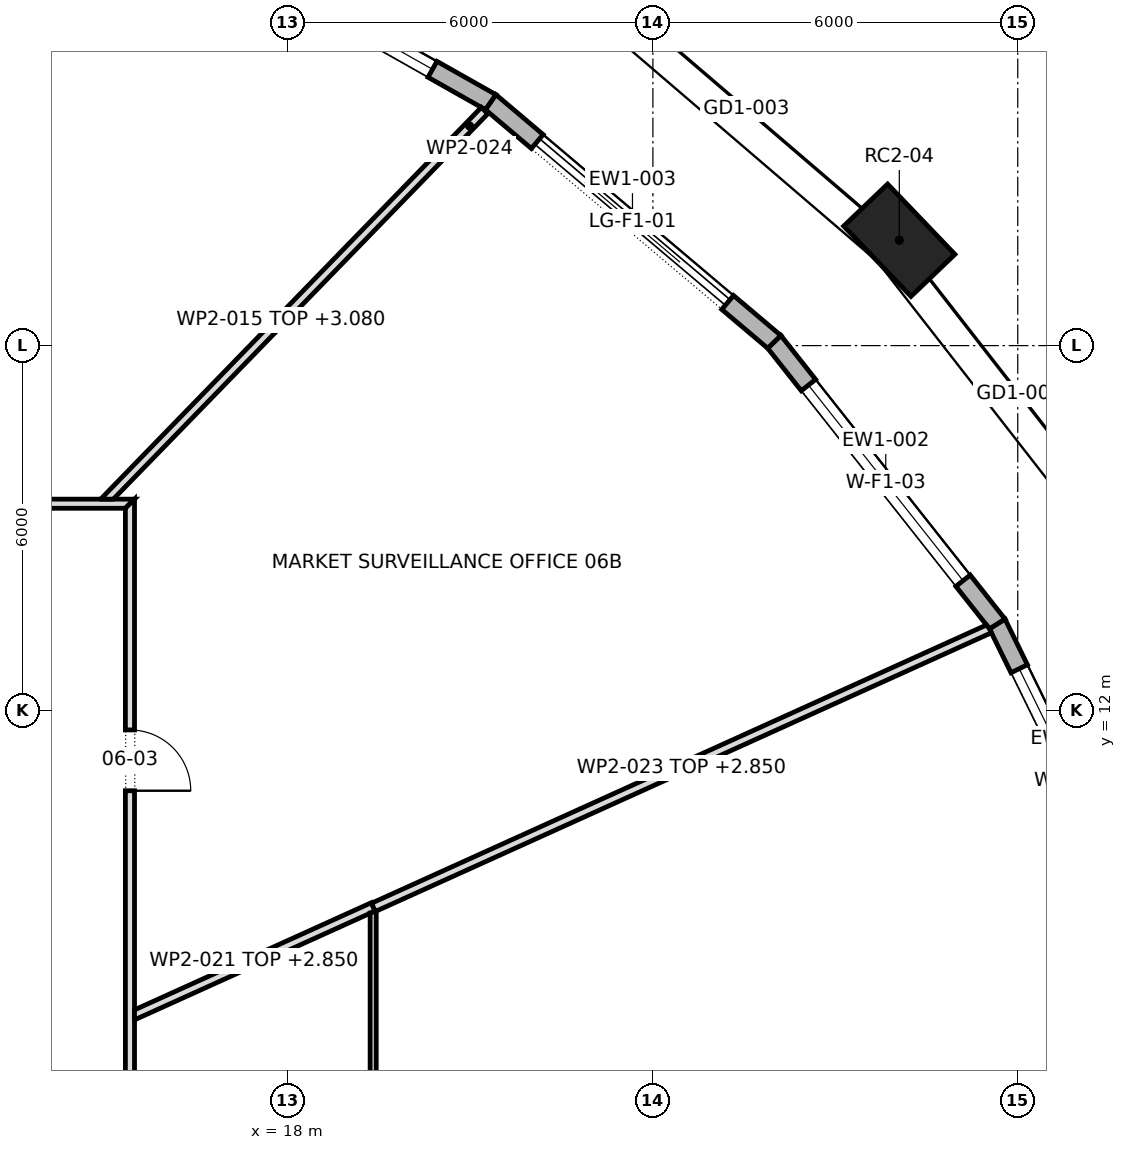
"""IFC4 building model, lengths in metres.
Left out: names, types, materials, properties, quantities, classifications, styles, units other than length and angle.
Written with IfcOpenShell. Run it as: python <this file> out.ifc"""

import sys

from ifc_helpers import new_model, si_unit, direction, frame, frame_2d, origin, origin_2d, place, context, subcontext, project, spatial, polyline, rectangle, outline, extrude, element, fill, save


model = new_model("IFC4")
c1 = context("Model", 3, precision=1e-05, world=origin(), true_north=direction((0.0, 1.0)))
c2 = subcontext(c1, "Body", "Model", "MODEL_VIEW")
j1 = project(units=[si_unit("LENGTHUNIT", "METRE"), si_unit("PLANEANGLEUNIT", "RADIAN")], contexts=[c1])
p1 = place(None, origin())
s1 = spatial("IfcSite", under=j1, at=p1, CompositionType="ELEMENT")
p2 = place(p1, origin())
s2 = spatial("IfcBuilding", under=s1, at=p2, CompositionType="ELEMENT")
p3 = place(p2, frame((0.0, 0.0, 86.5)))
s3 = spatial("IfcBuildingStorey", under=s2, at=p3, CompositionType="ELEMENT", Elevation=86.5)
p4 = place(p3, frame((28.052, 19.733, 0.0), z_axis=(0.0, 0.0, 1.0), x_axis=(-0.691576091297, 0.722303613411, 0.0)))
e1 = element("IfcColumn", 1, at=p4, inside=s3, PredefinedType="COLUMN", context=c2, shape_type="SweptSolid", body=[
    extrude(rectangle(XDim=1.6, YDim=1.0, at=origin_2d()), origin(), (0.0, 0.0, 1.0), 4.2),
])
p5 = place(p3, frame((32.19, 8.267, 0.0), z_axis=(0.0, 0.0, 1.0), x_axis=(-0.44010747541, 0.897945104162, 0.0)))
e2 = element("IfcWall", 2, at=p5, inside=s3, PredefinedType="STANDARD", context=c2, shape_type="SweptSolid", body=[
    extrude(outline(polyline([(-0.017, -0.15), (5.758, -0.15), (5.726, 0.15), (0.017, 0.15), (-0.017, -0.15)])), origin(), (0.0, 0.0, 1.0), 3.9),
])
p6 = place(p5, frame((0.821, 0.0, 0.6)))
e3 = element("IfcOpeningElement", 3, at=p6, cuts=e2, PredefinedType="OPENING", context=c2, shape_type="SweptSolid", body=[
    extrude(rectangle(XDim=4.1, YDim=2.85, at=frame_2d((2.05, 1.425))), frame((0.0, 0.162, 0.0), z_axis=(0.0, -1.0, 0.0), x_axis=(1.0, 0.0, 0.0)), (0.0, 0.0, 1.0), 0.324),
])
p7 = place(p3, frame((29.663, 13.423, 0.0), z_axis=(0.0, 0.0, 1.0), x_axis=(-0.620142219764, 0.784489405452, 0.0)))
e4 = element("IfcWall", 4, at=p7, inside=s3, PredefinedType="STANDARD", context=c2, shape_type="SweptSolid", body=[
    extrude(outline(polyline([(-0.016, -0.15), (5.927, -0.15), (5.897, 0.15), (0.016, 0.15), (-0.016, -0.15)])), origin(), (0.0, 0.0, 1.0), 3.9),
])
p8 = place(p7, frame((0.906, 0.0, 0.6)))
e5 = element("IfcOpeningElement", 5, at=p8, cuts=e4, PredefinedType="OPENING", context=c2, shape_type="SweptSolid", body=[
    extrude(rectangle(XDim=4.1, YDim=2.85, at=frame_2d((2.05, 1.425))), frame((0.0, 0.162, 0.0), z_axis=(0.0, -1.0, 0.0), x_axis=(1.0, 0.0, 0.0)), (0.0, 0.0, 1.0), 0.324),
])
p9 = place(p3, frame((25.996, 18.062, 0.0), z_axis=(0.0, 0.0, 1.0), x_axis=(-0.763753100684, 0.645508482667, 0.0)))
e6 = element("IfcWall", 6, at=p9, inside=s3, PredefinedType="STANDARD", context=c2, shape_type="SweptSolid", body=[
    extrude(outline(polyline([(-0.015, -0.15), (6.122, -0.15), (6.093, 0.15), (0.015, 0.15), (-0.015, -0.15)])), origin(), (0.0, 0.0, 1.0), 3.9),
])
p10 = place(p9, frame((1.004, 0.0, 0.0)))
e7 = element("IfcOpeningElement", 7, at=p10, cuts=e6, PredefinedType="OPENING", context=c2, shape_type="SweptSolid", body=[
    extrude(rectangle(XDim=4.1, YDim=3.45, at=frame_2d((2.05, 1.725))), frame((0.0, 0.162, 0.0), z_axis=(0.0, -1.0, 0.0), x_axis=(1.0, 0.0, 0.0)), (0.0, 0.0, 1.0), 0.324),
])
p11 = place(p3, frame((21.332, 22.004, 0.0), z_axis=(0.0, 0.0, 1.0), x_axis=(-0.870737550302, 0.491748023376, 0.0)))
e8 = element("IfcWall", 8, at=p11, inside=s3, PredefinedType="STANDARD", context=c2, shape_type="SweptSolid", body=[
    extrude(outline(polyline([(-0.014, -0.15), (6.31, -0.15), (6.283, 0.15), (0.014, 0.15), (-0.014, -0.15)])), origin(), (0.0, 0.0, 1.0), 3.9),
])
p12 = place(p11, frame((1.098, 0.0, 0.6)))
e9 = element("IfcOpeningElement", 9, at=p12, cuts=e8, PredefinedType="OPENING", context=c2, shape_type="SweptSolid", body=[
    extrude(rectangle(XDim=4.1, YDim=2.85, at=frame_2d((2.05, 1.425))), frame((0.0, 0.162, 0.0), z_axis=(0.0, -1.0, 0.0), x_axis=(1.0, 0.0, 0.0)), (0.0, 0.0, 1.0), 0.324),
])
p13 = place(p3, frame((-15.475, 15.4, 0.0), z_axis=(0.0, 0.0, 1.0), x_axis=(1.0, 0.0, 0.0)))
e10 = element("IfcWall", 10, at=p13, inside=s3, PredefinedType="PARTITIONING", context=c2, shape_type="SweptSolid", body=[
    extrude(outline(polyline([(0.15, -0.075), (2.066, -0.075), (3.981, -0.075), (5.897, -0.075), (7.812, -0.075), (9.728, -0.075), (11.644, -0.075), (13.56, -0.075), (15.475, -0.075), (17.391, -0.075), (19.306, -0.075), (21.222, -0.075), (23.138, -0.075), (25.053, -0.075), (26.969, -0.075), (28.885, -0.075), (30.8, -0.075), (30.95, 0.075), (29.016, 0.075), (27.081, 0.075), (25.147, 0.075), (23.212, 0.075), (21.278, 0.075), (19.344, 0.075), (17.409, 0.075), (15.475, 0.075), (13.541, 0.075), (11.606, 0.075), (9.672, 0.075), (7.738, 0.075), (5.803, 0.075), (3.869, 0.075), (1.935, 0.075), (0.0, 0.075), (0.15, -0.075)])), origin(), (0.0, 0.0, 1.0), 3.9),
])
p14 = place(p13, frame((21.155, 0.0, 0.0)))
e11 = element("IfcOpeningElement", 11, at=p14, cuts=e10, PredefinedType="OPENING", context=c2, shape_type="SweptSolid", body=[
    extrude(rectangle(XDim=1.8, YDim=2.1, at=frame_2d((0.9, 1.05))), frame((0.0, 0.087, 0.0), z_axis=(0.0, -1.0, 0.0), x_axis=(1.0, 0.0, 0.0)), (0.0, 0.0, 1.0), 0.174),
])
p15 = place(p13, frame((9.21, 0.0, 0.0)))
e12 = element("IfcOpeningElement", 12, at=p15, cuts=e10, PredefinedType="OPENING", context=c2, shape_type="SweptSolid", body=[
    extrude(rectangle(XDim=1.0, YDim=2.1, at=frame_2d((0.5, 1.05))), frame((0.0, 0.087, 0.0), z_axis=(0.0, -1.0, 0.0), x_axis=(1.0, 0.0, 0.0)), (0.0, 0.0, 1.0), 0.174),
])
p16 = place(p13, frame((2.405, 0.0, 0.0)))
e13 = element("IfcOpeningElement", 13, at=p16, cuts=e10, PredefinedType="OPENING", context=c2, shape_type="SweptSolid", body=[
    extrude(rectangle(XDim=1.0, YDim=2.1, at=frame_2d((0.5, 1.05))), frame((0.0, 0.087, 0.0), z_axis=(0.0, -1.0, 0.0), x_axis=(1.0, 0.0, 0.0)), (0.0, 0.0, 1.0), 0.174),
])
p17 = place(p3, frame((14.972, 15.423, 0.0), z_axis=(0.0, 0.0, 1.0), x_axis=(0.696854208529, 0.717212808067, 0.0)))
e14 = element("IfcWall", 14, at=p17, inside=s3, PredefinedType="PARTITIONING", context=c2, shape_type="SweptSolid", body=[
    extrude(outline(polyline([(0.0, 0.075), (0.0, 0.074), (0.145, -0.075), (1.771, -0.075), (3.397, -0.075), (5.023, -0.075), (6.649, -0.075), (8.274, -0.075), (8.274, 0.075), (6.62, 0.075), (4.965, 0.075), (3.31, 0.075), (1.655, 0.075), (0.0, 0.075)])), origin(), (0.0, 0.0, 1.0), 3.08),
])
p18 = place(p3, frame((15.4, -4.54, 0.0), z_axis=(0.0, 0.0, 1.0), x_axis=(0.0, 1.0, 0.0)))
e15 = element("IfcWall", 15, at=p18, inside=s3, PredefinedType="PARTITIONING", context=c2, shape_type="SweptSolid", body=[
    extrude(outline(polyline([(0.0, -0.075), (1.82, -0.075), (3.639, -0.075), (5.458, -0.075), (7.278, -0.075), (9.098, -0.075), (10.917, -0.075), (12.737, -0.075), (14.556, -0.075), (16.376, -0.075), (18.195, -0.075), (20.015, -0.075), (19.865, 0.075), (17.878, 0.075), (15.892, 0.075), (13.906, 0.075), (11.919, 0.075), (9.933, 0.075), (7.946, 0.075), (5.959, 0.075), (3.973, 0.075), (1.987, 0.075), (0.0, 0.075), (0.0, -0.075)])), origin(), (0.0, 0.0, 1.0), 3.9),
])
p19 = place(p18, frame((5.25, 0.0, 0.0)))
e16 = element("IfcOpeningElement", 16, at=p19, cuts=e15, PredefinedType="OPENING", context=c2, shape_type="SweptSolid", body=[
    extrude(rectangle(XDim=1.0, YDim=2.1, at=frame_2d((0.5, 1.05))), frame((0.0, 0.087, 0.0), z_axis=(0.0, -1.0, 0.0), x_axis=(1.0, 0.0, 0.0)), (0.0, 0.0, 1.0), 0.174),
])
p20 = place(p18, frame((15.22, 0.0, 0.0)))
e17 = element("IfcOpeningElement", 17, at=p20, cuts=e15, PredefinedType="OPENING", context=c2, shape_type="SweptSolid", body=[
    extrude(rectangle(XDim=1.0, YDim=2.1, at=frame_2d((0.5, 1.05))), frame((0.0, 0.087, 0.0), z_axis=(0.0, -1.0, 0.0), x_axis=(1.0, 0.0, 0.0)), (0.0, 0.0, 1.0), 0.174),
])
p21 = place(p3, frame((15.444, 6.98, 0.0), z_axis=(0.0, 0.0, 1.0), x_axis=(0.911064178848, 0.412264553436, 0.0)))
e18 = element("IfcWall", 18, at=p21, inside=s3, PredefinedType="PARTITIONING", context=c2, shape_type="SweptSolid", body=[
    extrude(outline(polyline([(0.0, -0.075), (1.418, -0.075), (2.835, -0.075), (4.253, -0.075), (4.254, -0.073), (4.259, -0.075), (4.342, -0.075), (4.342, 0.075), (2.917, 0.075), (1.493, 0.075), (0.068, 0.075), (0.0, -0.075)])), origin(), (0.0, 0.0, 1.0), 2.85),
])
p22 = place(p3, frame((19.4, -13.4, 0.0), z_axis=(0.0, 0.0, 1.0), x_axis=(0.0, 1.0, 0.0)))
e19 = element("IfcWall", 19, at=p22, inside=s3, PredefinedType="PARTITIONING", context=c2, shape_type="SweptSolid", body=[
    extrude(outline(polyline([(22.1, -0.05), (22.1, -0.049), (22.094, -0.036), (22.1, -0.033), (22.1, -0.027), (22.065, 0.05), (20.186, 0.05), (18.307, 0.05), (16.427, 0.05), (14.548, 0.05), (12.669, 0.05), (10.79, 0.05), (8.91, 0.05), (8.91, 0.05), (8.81, 0.05), (8.81, 0.05), (7.062, 0.05), (5.314, 0.05), (3.566, 0.05), (1.817, 0.05), (0.069, 0.05), (0.0, -0.05), (0.0, -0.05), (1.842, -0.05), (3.683, -0.05), (5.525, -0.05), (7.367, -0.05), (9.208, -0.05), (11.05, -0.05), (12.892, -0.05), (14.734, -0.05), (16.575, -0.05), (18.417, -0.05), (20.259, -0.05), (22.1, -0.05)])), origin(), (0.0, 0.0, 1.0), 3.9),
])
p23 = place(p22, frame((15.061, 0.0, 0.0)))
e20 = element("IfcOpeningElement", 20, at=p23, cuts=e19, PredefinedType="OPENING", context=c2, shape_type="SweptSolid", body=[
    extrude(rectangle(XDim=0.9, YDim=2.1, at=frame_2d((0.45, 1.05))), frame((0.0, 0.062, 0.0), z_axis=(0.0, -1.0, 0.0), x_axis=(1.0, 0.0, 0.0)), (0.0, 0.0, 1.0), 0.124),
])
p24 = place(p3, frame((19.404, 8.762, 0.0), z_axis=(0.0, 0.0, 1.0), x_axis=(0.911089862884, 0.41220778953, 0.0)))
e21 = element("IfcWall", 21, at=p24, inside=s3, PredefinedType="PARTITIONING", context=c2, shape_type="SweptSolid", body=[
    extrude(outline(polyline([(11.121, -0.075), (11.121, -0.067), (11.119, -0.002), (11.099, 0.075), (9.25, 0.075), (7.4, 0.075), (5.55, 0.075), (3.7, 0.075), (1.85, 0.075), (0.0, 0.075), (0.0, -0.068), (0.015, -0.075), (1.866, -0.075), (3.717, -0.075), (5.568, -0.075), (7.419, -0.075), (9.27, -0.075), (11.121, -0.075)])), origin(), (0.0, 0.0, 1.0), 2.85),
])
p25 = place(p3, frame((20.739, 21.358, 0.0), z_axis=(0.0, 0.0, 1.0), x_axis=(0.697039010439, 0.717033205595, 0.0)))
e22 = element("IfcWall", 22, at=p25, inside=s3, PredefinedType="PARTITIONING", context=c2, shape_type="SweptSolid", body=[
    extrude(outline(polyline([(0.0, 0.075), (0.0, -0.075), (0.708, -0.075), (0.708, 0.075), (0.0, 0.075)])), origin(), (0.0, 0.0, 1.0), 3.9),
])
p26 = place(p6, origin())
e23 = element("IfcWindow", 23, at=p26, inside=s3, PartitioningType="TRIPLE_PANEL_VERTICAL", PredefinedType="WINDOW", context=c2, shape_type="SweptSolid", body=[
    extrude(rectangle(XDim=4.1, YDim=2.85, at=frame_2d((2.05, 1.425))), frame((0.0, 0.03, 0.0), z_axis=(0.0, -1.0, 0.0), x_axis=(1.0, 0.0, 0.0)), (0.0, 0.0, 1.0), 0.06),
])
fill(e3, e23)
p27 = place(p8, origin())
e24 = element("IfcWindow", 24, at=p27, inside=s3, PartitioningType="TRIPLE_PANEL_VERTICAL", PredefinedType="WINDOW", context=c2, shape_type="SweptSolid", body=[
    extrude(rectangle(XDim=4.1, YDim=2.85, at=frame_2d((2.05, 1.425))), frame((0.0, 0.03, 0.0), z_axis=(0.0, -1.0, 0.0), x_axis=(1.0, 0.0, 0.0)), (0.0, 0.0, 1.0), 0.06),
])
fill(e5, e24)
p28 = place(p10, origin())
e25 = element("IfcDoor", 25, at=p28, inside=s3, OperationType="DOUBLE_DOOR_SLIDING", PredefinedType="DOOR", context=c2, shape_type="SweptSolid", body=[
    extrude(rectangle(XDim=4.1, YDim=3.45, at=frame_2d((2.05, 1.725))), frame((0.0, 0.025, 0.0), z_axis=(0.0, -1.0, 0.0), x_axis=(1.0, 0.0, 0.0)), (0.0, 0.0, 1.0), 0.05),
])
fill(e7, e25)
p29 = place(p12, origin())
e26 = element("IfcWindow", 26, at=p29, inside=s3, PartitioningType="TRIPLE_PANEL_VERTICAL", PredefinedType="WINDOW", context=c2, shape_type="SweptSolid", body=[
    extrude(rectangle(XDim=4.1, YDim=2.85, at=frame_2d((2.05, 1.425))), frame((0.0, 0.03, 0.0), z_axis=(0.0, -1.0, 0.0), x_axis=(1.0, 0.0, 0.0)), (0.0, 0.0, 1.0), 0.06),
])
fill(e9, e26)
p30 = place(p20, frame((1.0, 0.0, 0.0), z_axis=(0.0, 0.0, 1.0), x_axis=(-1.0, 0.0, 0.0)))
e27 = element("IfcDoor", 27, at=p30, inside=s3, OperationType="SINGLE_SWING_LEFT", PredefinedType="DOOR", context=c2, shape_type="SweptSolid", body=[
    extrude(rectangle(XDim=1.0, YDim=2.1, at=frame_2d((0.5, 1.05))), frame((0.0, 0.025, 0.0), z_axis=(0.0, -1.0, 0.0), x_axis=(1.0, 0.0, 0.0)), (0.0, 0.0, 1.0), 0.05),
])
fill(e17, e27)
save(model, sys.argv[1])
